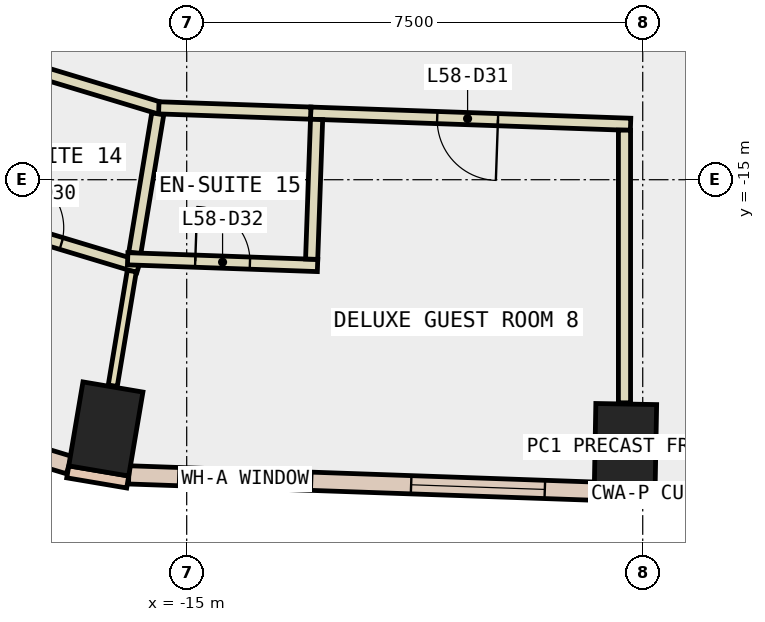
"""IFC4 building model, lengths in metres.
Left out: names, types, materials, properties, quantities, classifications, styles, units other than length and angle.
Written with IfcOpenShell. Run it as: python <this file> out.ifc"""

import sys

from ifc_helpers import new_model, si_unit, direction, frame, frame_2d, origin, origin_2d, place, context, subcontext, project, spatial, rectangle, extrude, element, fill, save


model = new_model("IFC4")
c1 = context("Model", 3, precision=1e-05, world=origin(), true_north=direction((0.0, 1.0)))
c2 = subcontext(c1, "Body", "Model", "MODEL_VIEW")
j1 = project(units=[si_unit("LENGTHUNIT", "METRE"), si_unit("PLANEANGLEUNIT", "RADIAN")], contexts=[c1])
p1 = place(None, origin())
s1 = spatial("IfcSite", under=j1, at=p1, CompositionType="ELEMENT")
p2 = place(p1, origin())
s2 = spatial("IfcBuilding", under=s1, at=p2, CompositionType="ELEMENT")
p3 = place(p2, frame((0.0, 0.0, 255.8)))
s3 = spatial("IfcBuildingStorey", under=s2, at=p3, CompositionType="ELEMENT", Elevation=255.8)
for number, where, z_axis, x_axis in (
    (1, (-16.33, -19.099, -0.34), (0.0, 0.0, 1.0), (-0.986, 0.167, 0.0)),
    (2, (-7.784, -19.389, -0.34), (0.0, 0.0, 1.0), (-1.0, 0.018, 0.0)),
):
    element("IfcColumn", number, at=place(p3, frame(where, z_axis=z_axis, x_axis=x_axis)), inside=s3, PredefinedType="COLUMN", context=c2, shape_type="SweptSolid", body=[
        extrude(rectangle(XDim=1.0, YDim=1.4, at=origin_2d()), origin(), (0.0, 0.0, 1.0), 3.6),
    ])
for number, where, z_axis, x_axis in (
    (3, (-16.956, -19.804, 0.0), (0.0, 0.0, 1.0), (0.986, -0.167, 0.0)),
    (4, (-8.298, -20.18, 0.0), (0.0, 0.0, 1.0), (1.0, -0.018, 0.0)),
):
    element("IfcWall", number, at=place(p3, frame(where, z_axis=z_axis, x_axis=x_axis)), inside=s3, PredefinedType="STANDARD", context=c2, shape_type="SweptSolid", body=[
        extrude(rectangle(XDim=1.0, YDim=0.2, at=frame_2d((0.5, 0.0))), origin(), (0.0, 0.0, 1.0), 3.26),
    ])
p4 = place(p3, frame((-15.952, -19.854, 0.0), z_axis=(0.0, 0.0, 1.0), x_axis=(0.999387577449, -0.034992428331, 0.0)))
e5 = element("IfcWall", 5, at=p4, inside=s3, PredefinedType="STANDARD", context=c2, shape_type="SweptSolid", body=[
    extrude(rectangle(XDim=7.661, YDim=0.3, at=frame_2d((3.83, 0.0))), origin(), (0.0, 0.0, 1.0), 3.26),
])
p5 = place(p4, frame((0.815, 0.0, 0.9)))
e6 = element("IfcOpeningElement", 6, at=p5, cuts=e5, PredefinedType="OPENING", context=c2, shape_type="SweptSolid", body=[
    extrude(rectangle(XDim=2.2, YDim=2.0, at=frame_2d((1.1, 1.0))), frame((0.0, 0.16, 0.0), z_axis=(0.0, -1.0, 0.0), x_axis=(1.0, 0.0, 0.0)), (0.0, 0.0, 1.0), 0.32),
])
p6 = place(p4, frame((4.646, 0.0, 0.9)))
e7 = element("IfcOpeningElement", 7, at=p6, cuts=e5, PredefinedType="OPENING", context=c2, shape_type="SweptSolid", body=[
    extrude(rectangle(XDim=2.2, YDim=2.0, at=frame_2d((1.1, 1.0))), frame((0.0, 0.16, 0.0), z_axis=(0.0, -1.0, 0.0), x_axis=(1.0, 0.0, 0.0)), (0.0, 0.0, 1.0), 0.32),
])
p7 = place(p3, frame((-21.034, -18.455, 0.0), z_axis=(0.0, 0.0, 1.0), x_axis=(0.957346168713, -0.288943442997, 0.0)))
e8 = element("IfcWall", 8, at=p7, inside=s3, PredefinedType="STANDARD", context=c2, shape_type="SweptSolid", body=[
    extrude(rectangle(XDim=4.281, YDim=0.3, at=frame_2d((2.14, 0.0))), origin(), (0.0, 0.0, 1.0), 3.26),
])
p8 = place(p7, frame((1.44, 0.0, 0.9)))
e9 = element("IfcOpeningElement", 9, at=p8, cuts=e8, PredefinedType="OPENING", context=c2, shape_type="SweptSolid", body=[
    extrude(rectangle(XDim=1.4, YDim=2.0, at=frame_2d((0.7, 1.0))), frame((0.0, 0.16, 0.0), z_axis=(0.0, -1.0, 0.0), x_axis=(1.0, 0.0, 0.0)), (0.0, 0.0, 1.0), 0.32),
])
p9 = place(p3, frame((-15.363, -13.847, 0.0), z_axis=(0.0, 0.0, 1.0), x_axis=(-0.957320969561, 0.289026921303, 0.0)))
e10 = element("IfcWall", 10, at=p9, inside=s3, PredefinedType="PARTITIONING", context=c2, shape_type="SweptSolid", body=[
    extrude(rectangle(XDim=3.214, YDim=0.2, at=frame_2d((1.607, 0.0))), origin(), (0.0, 0.0, 1.0), 3.26),
])
p10 = place(p3, frame((-7.7, -14.089, 0.0), z_axis=(0.0, 0.0, 1.0), x_axis=(-0.999388410674, 0.034968623214, 0.0)))
e11 = element("IfcWall", 11, at=p10, inside=s3, PredefinedType="PARTITIONING", context=c2, shape_type="SweptSolid", body=[
    extrude(rectangle(XDim=5.264, YDim=0.2, at=frame_2d((2.632, 0.0))), origin(), (0.0, 0.0, 1.0), 3.26),
])
p11 = place(p10, frame((2.182, 0.0, 0.0)))
e12 = element("IfcOpeningElement", 12, at=p11, cuts=e11, PredefinedType="OPENING", context=c2, shape_type="SweptSolid", body=[
    extrude(rectangle(XDim=1.0, YDim=2.1, at=frame_2d((0.5, 1.05))), frame((0.0, 0.11, 0.0), z_axis=(0.0, -1.0, 0.0), x_axis=(1.0, 0.0, 0.0)), (0.0, 0.0, 1.0), 0.22),
])
p12 = place(p3, frame((-12.961, -13.905, 0.0), z_axis=(0.0, 0.0, 1.0), x_axis=(-0.999395279268, 0.034771766949, 0.0)))
e13 = element("IfcWall", 13, at=p12, inside=s3, PredefinedType="PARTITIONING", context=c2, shape_type="SweptSolid", body=[
    extrude(rectangle(XDim=2.5, YDim=0.2, at=frame_2d((1.25, 0.0))), origin(), (0.0, 0.0, 1.0), 3.26),
])
p13 = place(p3, frame((-7.8, -18.669, 0.0), z_axis=(0.0, 0.0, 1.0), x_axis=(0.0, 1.0, 0.0)))
e14 = element("IfcWall", 14, at=p13, inside=s3, PredefinedType="PARTITIONING", context=c2, shape_type="SweptSolid", body=[
    extrude(rectangle(XDim=4.484, YDim=0.2, at=frame_2d((2.242, 0.0))), origin(), (0.0, 0.0, 1.0), 3.26),
])
p14 = place(p3, frame((-19.191, -15.407, 0.0), z_axis=(0.0, 0.0, 1.0), x_axis=(0.957443200759, -0.28862175476, 0.0)))
e15 = element("IfcWall", 15, at=p14, inside=s3, PredefinedType="PARTITIONING", context=c2, shape_type="SweptSolid", body=[
    extrude(rectangle(XDim=3.551, YDim=0.2, at=frame_2d((1.775, 0.0))), origin(), (0.0, 0.0, 1.0), 3.26),
])
p15 = place(p14, frame((1.325, 0.0, 0.0)))
e16 = element("IfcOpeningElement", 16, at=p15, cuts=e15, PredefinedType="OPENING", context=c2, shape_type="SweptSolid", body=[
    extrude(rectangle(XDim=0.9, YDim=2.1, at=frame_2d((0.45, 1.05))), frame((0.0, 0.11, 0.0), z_axis=(0.0, -1.0, 0.0), x_axis=(1.0, 0.0, 0.0)), (0.0, 0.0, 1.0), 0.22),
])
p16 = place(p3, frame((-15.903, -16.502, 0.0), z_axis=(0.0, 0.0, 1.0), x_axis=(-0.163715562906, -0.986507584594, 0.0)))
e17 = element("IfcWall", 17, at=p16, inside=s3, PredefinedType="PARTITIONING", context=c2, shape_type="SweptSolid", body=[
    extrude(rectangle(XDim=1.912, YDim=0.15, at=frame_2d((0.956, 0.0))), origin(), (0.0, 0.0, 1.0), 3.26),
])
p17 = place(p3, frame((-15.476, -13.917, 0.0), z_axis=(0.0, 0.0, 1.0), x_axis=(-0.162964805234, -0.986631882849, 0.0)))
e18 = element("IfcWall", 18, at=p17, inside=s3, PredefinedType="PARTITIONING", context=c2, shape_type="SweptSolid", body=[
    extrude(rectangle(XDim=2.319, YDim=0.2, at=frame_2d((1.16, 0.0))), origin(), (0.0, 0.0, 1.0), 3.26),
])
p18 = place(p3, frame((-15.971, -16.3, 0.0), z_axis=(0.0, 0.0, 1.0), x_axis=(0.999370791233, -0.035468600627, 0.0)))
e19 = element("IfcWall", 19, at=p18, inside=s3, PredefinedType="PARTITIONING", context=c2, shape_type="SweptSolid", body=[
    extrude(rectangle(XDim=3.125, YDim=0.2, at=frame_2d((1.562, 0.0))), origin(), (0.0, 0.0, 1.0), 3.26),
])
p19 = place(p18, frame((1.112, 0.0, 0.0)))
e20 = element("IfcOpeningElement", 20, at=p19, cuts=e19, PredefinedType="OPENING", context=c2, shape_type="SweptSolid", body=[
    extrude(rectangle(XDim=0.9, YDim=2.1, at=frame_2d((0.45, 1.05))), frame((0.0, 0.11, 0.0), z_axis=(0.0, -1.0, 0.0), x_axis=(1.0, 0.0, 0.0)), (0.0, 0.0, 1.0), 0.22),
])
p20 = place(p3, frame((-12.945, -16.307, 0.0), z_axis=(0.0, 0.0, 1.0), x_axis=(0.035252193458, 0.999378448265, 0.0)))
e21 = element("IfcWall", 21, at=p20, inside=s3, PredefinedType="PARTITIONING", context=c2, shape_type="SweptSolid", body=[
    extrude(rectangle(XDim=2.299, YDim=0.2, at=frame_2d((1.15, 0.0))), origin(), (0.0, 0.0, 1.0), 3.26),
])
p21 = place(p5, origin())
e22 = element("IfcWindow", 22, at=p21, inside=s3, PartitioningType="SINGLE_PANEL", PredefinedType="WINDOW", context=c2, shape_type="SweptSolid", body=[
    extrude(rectangle(XDim=2.2, YDim=2.0, at=frame_2d((1.1, 1.0))), frame((0.0, 0.03, 0.0), z_axis=(0.0, -1.0, 0.0), x_axis=(1.0, 0.0, 0.0)), (0.0, 0.0, 1.0), 0.06),
])
fill(e6, e22)
p22 = place(p6, origin())
e23 = element("IfcWindow", 23, at=p22, inside=s3, PartitioningType="SINGLE_PANEL", PredefinedType="WINDOW", context=c2, shape_type="SweptSolid", body=[
    extrude(rectangle(XDim=2.2, YDim=2.0, at=frame_2d((1.1, 1.0))), frame((0.0, 0.03, 0.0), z_axis=(0.0, -1.0, 0.0), x_axis=(1.0, 0.0, 0.0)), (0.0, 0.0, 1.0), 0.06),
])
fill(e7, e23)
p23 = place(p15, origin())
e24 = element("IfcDoor", 24, at=p23, inside=s3, OperationType="SINGLE_SWING_LEFT", PredefinedType="DOOR", context=c2, shape_type="SweptSolid", body=[
    extrude(rectangle(XDim=0.9, YDim=2.1, at=frame_2d((0.45, 1.05))), frame((0.0, 0.025, 0.0), z_axis=(0.0, -1.0, 0.0), x_axis=(1.0, 0.0, 0.0)), (0.0, 0.0, 1.0), 0.05),
])
fill(e16, e24)
p24 = place(p11, origin())
e25 = element("IfcDoor", 25, at=p24, inside=s3, OperationType="SINGLE_SWING_LEFT", PredefinedType="DOOR", context=c2, shape_type="SweptSolid", body=[
    extrude(rectangle(XDim=1.0, YDim=2.1, at=frame_2d((0.5, 1.05))), frame((0.0, 0.025, 0.0), z_axis=(0.0, -1.0, 0.0), x_axis=(1.0, 0.0, 0.0)), (0.0, 0.0, 1.0), 0.05),
])
fill(e12, e25)
p25 = place(p19, origin())
e26 = element("IfcDoor", 26, at=p25, inside=s3, OperationType="SINGLE_SWING_LEFT", PredefinedType="DOOR", context=c2, shape_type="SweptSolid", body=[
    extrude(rectangle(XDim=0.9, YDim=2.1, at=frame_2d((0.45, 1.05))), frame((0.0, 0.025, 0.0), z_axis=(0.0, -1.0, 0.0), x_axis=(1.0, 0.0, 0.0)), (0.0, 0.0, 1.0), 0.05),
])
fill(e20, e26)
save(model, sys.argv[1])
